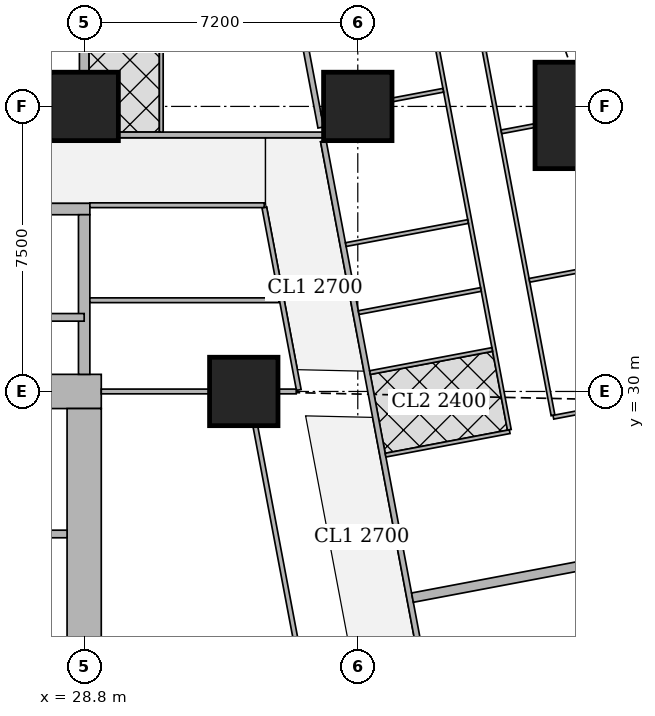
"""IFC4 building model, lengths in metres.
Left out: names, types, materials, properties, quantities, classifications, styles, units other than length and angle.
Written with IfcOpenShell. Run it as: python <this file> out.ifc"""

import sys

from ifc_helpers import new_model, si_unit, direction, frame, frame_2d, origin, origin_2d, place, context, subcontext, project, spatial, rectangle, extrude, element, fill, save


model = new_model("IFC4")
c1 = context("Model", 3, precision=1e-05, world=origin(), true_north=direction((0.0, 1.0)))
c2 = subcontext(c1, "Body", "Model", "MODEL_VIEW")
j1 = project(units=[si_unit("LENGTHUNIT", "METRE"), si_unit("PLANEANGLEUNIT", "RADIAN")], contexts=[c1])
p1 = place(None, origin())
s1 = spatial("IfcSite", under=j1, at=p1, CompositionType="ELEMENT")
p2 = place(p1, origin())
s2 = spatial("IfcBuilding", under=s1, at=p2, CompositionType="ELEMENT")
p3 = place(p2, frame((0.0, 0.0, 53.75)))
s3 = spatial("IfcBuildingStorey", under=s2, at=p3, CompositionType="ELEMENT", Elevation=53.75)
for number, where, z_axis, x_axis in (
    (1, (33.0, 30.0, 0.0), (0.0, 0.0, 1.0), (1.0, 0.0, 0.0)),
    (2, (28.8, 37.5, 0.0), (0.0, 0.0, 1.0), (1.0, 0.0, 0.0)),
    (3, (36.0, 37.5, 0.0), (0.0, 0.0, 1.0), (1.0, 0.0, 0.0)),
):
    element("IfcColumn", number, at=place(p3, frame(where, z_axis=z_axis, x_axis=x_axis)), inside=s3, PredefinedType="COLUMN", context=c2, shape_type="SweptSolid", body=[
        extrude(rectangle(XDim=1.8, YDim=1.8, at=origin_2d()), origin(), (0.0, 0.0, 1.0), 3.75),
    ])
p4 = place(p3, frame((42.064, 37.263, 0.0), z_axis=(0.0, 0.0, 1.0), x_axis=(1.0, 0.0, 0.0)))
e4 = element("IfcColumn", 4, at=p4, inside=s3, PredefinedType="COLUMN", context=c2, shape_type="SweptSolid", body=[
    extrude(rectangle(XDim=2.8, YDim=2.8, at=origin_2d()), origin(), (0.0, 0.0, 1.0), 3.75),
])
p5 = place(p3, frame((13.95, 30.0, 0.0), z_axis=(0.0, 0.0, 1.0), x_axis=(1.0, 0.0, 0.0)))
e5 = element("IfcWall", 5, at=p5, inside=s3, PredefinedType="SHEAR", context=c2, shape_type="SweptSolid", body=[
    extrude(rectangle(XDim=15.3, YDim=0.9, at=frame_2d((7.65, 0.0))), origin(), (0.0, 0.0, 1.0), 3.75),
])
p6 = place(p5, frame((4.45, 0.0, 0.0)))
e6 = element("IfcOpeningElement", 6, at=p6, cuts=e5, PredefinedType="OPENING", context=c2, shape_type="SweptSolid", body=[
    extrude(rectangle(XDim=1.8, YDim=2.1, at=frame_2d((0.9, 1.05))), frame((0.0, 0.46, 0.0), z_axis=(0.0, -1.0, 0.0), x_axis=(1.0, 0.0, 0.0)), (0.0, 0.0, 1.0), 0.92),
])
p7 = place(p5, frame((10.7, 0.0, 0.0)))
e7 = element("IfcOpeningElement", 7, at=p7, cuts=e5, PredefinedType="OPENING", context=c2, shape_type="SweptSolid", body=[
    extrude(rectangle(XDim=1.1, YDim=2.1, at=frame_2d((0.55, 1.05))), frame((0.0, 0.46, 0.0), z_axis=(0.0, -1.0, 0.0), x_axis=(1.0, 0.0, 0.0)), (0.0, 0.0, 1.0), 0.92),
])
p8 = place(p3, frame((28.8, 15.45, 0.0), z_axis=(0.0, 0.0, 1.0), x_axis=(0.0, 1.0, 0.0)))
e8 = element("IfcWall", 8, at=p8, inside=s3, PredefinedType="SHEAR", context=c2, shape_type="SweptSolid", body=[
    extrude(rectangle(XDim=14.1, YDim=0.9, at=frame_2d((7.05, 0.0))), origin(), (0.0, 0.0, 1.0), 3.75),
])
p9 = place(p3, frame((21.45, 34.8, 0.0), z_axis=(0.0, 0.0, 1.0), x_axis=(1.0, 0.0, 0.0)))
e9 = element("IfcWall", 9, at=p9, inside=s3, PredefinedType="SHEAR", context=c2, shape_type="SweptSolid", body=[
    extrude(rectangle(XDim=7.5, YDim=0.3, at=frame_2d((3.75, 0.0))), origin(), (0.0, 0.0, 1.0), 3.75),
])
p10 = place(p9, frame((0.5, 0.0, 0.0)))
e10 = element("IfcOpeningElement", 10, at=p10, cuts=e9, PredefinedType="OPENING", context=c2, shape_type="SweptSolid", body=[
    extrude(rectangle(XDim=1.1, YDim=2.1, at=frame_2d((0.55, 1.05))), frame((0.0, 0.16, 0.0), z_axis=(0.0, -1.0, 0.0), x_axis=(1.0, 0.0, 0.0)), (0.0, 0.0, 1.0), 0.32),
])
p11 = place(p3, frame((28.8, 30.45, 0.0), z_axis=(0.0, 0.0, 1.0), x_axis=(0.0, 1.0, 0.0)))
e11 = element("IfcWall", 11, at=p11, inside=s3, PredefinedType="SHEAR", context=c2, shape_type="SweptSolid", body=[
    extrude(rectangle(XDim=4.2, YDim=0.3, at=frame_2d((2.1, 0.0))), origin(), (0.0, 0.0, 1.0), 3.75),
])
p12 = place(p3, frame((29.701, 36.75, 0.0), z_axis=(0.0, 0.0, 1.0), x_axis=(1.0, 0.0, 0.0)))
e12 = element("IfcWall", 12, at=p12, inside=s3, PredefinedType="SOLIDWALL", context=c2, shape_type="SweptSolid", body=[
    extrude(rectangle(XDim=5.399, YDim=0.15, at=frame_2d((2.7, 0.0))), origin(), (0.0, 0.0, 1.0), 3.5),
])
p13 = place(p12, frame((2.745, 0.0, 0.0)))
e13 = element("IfcOpeningElement", 13, at=p13, cuts=e12, PredefinedType="OPENING", context=c2, shape_type="SweptSolid", body=[
    extrude(rectangle(XDim=1.0, YDim=2.1, at=frame_2d((0.5, 1.05))), frame((0.0, 0.085, 0.0), z_axis=(0.0, -1.0, 0.0), x_axis=(1.0, 0.0, 0.0)), (0.0, 0.0, 1.0), 0.17),
])
p14 = place(p3, frame((33.933, 42.73, 0.0), z_axis=(0.0, 0.0, 1.0), x_axis=(0.185617897238, -0.982622000682, 0.0)))
e14 = element("IfcWall", 14, at=p14, inside=s3, PredefinedType="SOLIDWALL", context=c2, shape_type="SweptSolid", body=[
    extrude(rectangle(XDim=5.887, YDim=0.15, at=frame_2d((2.944, 0.0))), origin(), (0.0, 0.0, 1.0), 3.5),
])
p15 = place(p3, frame((35.094, 36.585, 0.0), z_axis=(0.0, 0.0, 1.0), x_axis=(0.185588860311, -0.982627485331, 0.0)))
e15 = element("IfcWall", 15, at=p15, inside=s3, PredefinedType="SOLIDWALL", context=c2, shape_type="SweptSolid", body=[
    extrude(rectangle(XDim=34.797, YDim=0.15, at=frame_2d((17.399, 0.0))), origin(), (0.0, 0.0, 1.0), 2.5),
])
p16 = place(p15, frame((9.828, 0.0, 0.0)))
e16 = element("IfcOpeningElement", 16, at=p16, cuts=e15, PredefinedType="OPENING", context=c2, shape_type="SweptSolid", body=[
    extrude(rectangle(XDim=1.0, YDim=2.1, at=frame_2d((0.5, 1.05))), frame((0.0, 0.085, 0.0), z_axis=(0.0, -1.0, 0.0), x_axis=(1.0, 0.0, 0.0)), (0.0, 0.0, 1.0), 0.17),
])
p17 = place(p15, frame((13.645, 0.0, 0.0)))
e17 = element("IfcOpeningElement", 17, at=p17, cuts=e15, PredefinedType="OPENING", context=c2, shape_type="SweptSolid", body=[
    extrude(rectangle(XDim=1.0, YDim=2.1, at=frame_2d((0.5, 1.05))), frame((0.0, 0.085, 0.0), z_axis=(0.0, -1.0, 0.0), x_axis=(1.0, 0.0, 0.0)), (0.0, 0.0, 1.0), 0.17),
])
p18 = place(p15, frame((25.9, 0.0, 0.0)))
e18 = element("IfcOpeningElement", 18, at=p18, cuts=e15, PredefinedType="OPENING", context=c2, shape_type="SweptSolid", body=[
    extrude(rectangle(XDim=1.0, YDim=2.1, at=frame_2d((0.5, 1.05))), frame((0.0, 0.085, 0.0), z_axis=(0.0, -1.0, 0.0), x_axis=(1.0, 0.0, 0.0)), (0.0, 0.0, 1.0), 0.17),
])
p19 = place(p3, frame((38.9, 41.22, 0.0), z_axis=(0.0, 0.0, 1.0), x_axis=(0.185521843026, -0.98264014052, 0.0)))
e19 = element("IfcWall", 19, at=p19, inside=s3, PredefinedType="PARTITIONING", context=c2, shape_type="SweptSolid", body=[
    extrude(rectangle(XDim=12.058, YDim=0.1, at=frame_2d((6.029, 0.0))), origin(), (0.0, 0.0, 1.0), 2.5),
])
p20 = place(p19, frame((9.55, 0.0, 0.0)))
e20 = element("IfcOpeningElement", 20, at=p20, cuts=e19, PredefinedType="OPENING", context=c2, shape_type="SweptSolid", body=[
    extrude(rectangle(XDim=0.9, YDim=2.1, at=frame_2d((0.45, 1.05))), frame((0.0, 0.06, 0.0), z_axis=(0.0, -1.0, 0.0), x_axis=(1.0, 0.0, 0.0)), (0.0, 0.0, 1.0), 0.12),
])
p21 = place(p19, frame((7.352, 0.0, 0.0)))
e21 = element("IfcOpeningElement", 21, at=p21, cuts=e19, PredefinedType="OPENING", context=c2, shape_type="SweptSolid", body=[
    extrude(rectangle(XDim=0.9, YDim=2.1, at=frame_2d((0.45, 1.05))), frame((0.0, 0.06, 0.0), z_axis=(0.0, -1.0, 0.0), x_axis=(1.0, 0.0, 0.0)), (0.0, 0.0, 1.0), 0.12),
])
p22 = place(p19, frame((1.9, 0.0, 0.0)))
e22 = element("IfcOpeningElement", 22, at=p22, cuts=e19, PredefinedType="OPENING", context=c2, shape_type="SweptSolid", body=[
    extrude(rectangle(XDim=0.9, YDim=2.1, at=frame_2d((0.45, 1.05))), frame((0.0, 0.06, 0.0), z_axis=(0.0, -1.0, 0.0), x_axis=(1.0, 0.0, 0.0)), (0.0, 0.0, 1.0), 0.12),
])
p23 = place(p3, frame((37.514, 42.089, 0.0), z_axis=(0.0, 0.0, 1.0), x_axis=(0.1856087397, -0.982623730503, 0.0)))
e23 = element("IfcWall", 23, at=p23, inside=s3, PredefinedType="PARTITIONING", context=c2, shape_type="SweptSolid", body=[
    extrude(rectangle(XDim=13.33, YDim=0.1, at=frame_2d((6.665, 0.0))), origin(), (0.0, 0.0, 1.0), 2.5),
])
p24 = place(p23, frame((11.825, 0.0, 0.0)))
e24 = element("IfcOpeningElement", 24, at=p24, cuts=e23, PredefinedType="OPENING", context=c2, shape_type="SweptSolid", body=[
    extrude(rectangle(XDim=0.9, YDim=2.1, at=frame_2d((0.45, 1.05))), frame((0.0, 0.06, 0.0), z_axis=(0.0, -1.0, 0.0), x_axis=(1.0, 0.0, 0.0)), (0.0, 0.0, 1.0), 0.12),
])
p25 = place(p23, frame((8.203, 0.0, 0.0)))
e25 = element("IfcOpeningElement", 25, at=p25, cuts=e23, PredefinedType="OPENING", context=c2, shape_type="SweptSolid", body=[
    extrude(rectangle(XDim=0.9, YDim=2.1, at=frame_2d((0.45, 1.05))), frame((0.0, 0.06, 0.0), z_axis=(0.0, -1.0, 0.0), x_axis=(1.0, 0.0, 0.0)), (0.0, 0.0, 1.0), 0.12),
])
p26 = place(p23, frame((2.63, 0.0, 0.0)))
e26 = element("IfcOpeningElement", 26, at=p26, cuts=e23, PredefinedType="OPENING", context=c2, shape_type="SweptSolid", body=[
    extrude(rectangle(XDim=0.9, YDim=2.1, at=frame_2d((0.45, 1.05))), frame((0.0, 0.06, 0.0), z_axis=(0.0, -1.0, 0.0), x_axis=(1.0, 0.0, 0.0)), (0.0, 0.0, 1.0), 0.12),
])
p27 = place(p23, frame((9.916, 0.0, 0.0)))
e27 = element("IfcOpeningElement", 27, at=p27, cuts=e23, PredefinedType="OPENING", context=c2, shape_type="SweptSolid", body=[
    extrude(rectangle(XDim=0.9, YDim=2.1, at=frame_2d((0.45, 1.05))), frame((0.0, 0.06, 0.0), z_axis=(0.0, -1.0, 0.0), x_axis=(1.0, 0.0, 0.0)), (0.0, 0.0, 1.0), 0.12),
])
p28 = place(p23, frame((5.535, 0.0, 0.0)))
e28 = element("IfcOpeningElement", 28, at=p28, cuts=e23, PredefinedType="OPENING", context=c2, shape_type="SweptSolid", body=[
    extrude(rectangle(XDim=0.9, YDim=2.1, at=frame_2d((0.45, 1.05))), frame((0.0, 0.06, 0.0), z_axis=(0.0, -1.0, 0.0), x_axis=(1.0, 0.0, 0.0)), (0.0, 0.0, 1.0), 0.12),
])
p29 = place(p3, frame((40.654, 36.996, 0.0), z_axis=(0.0, 0.0, 1.0), x_axis=(-0.982672962335, -0.185347913655, 0.0)))
e29 = element("IfcWall", 29, at=p29, inside=s3, PredefinedType="PARTITIONING", context=c2, shape_type="SweptSolid", body=[
    extrude(rectangle(XDim=0.89, YDim=0.1, at=frame_2d((0.445, 0.0))), origin(), (0.0, 0.0, 1.0), 3.5),
])
p30 = place(p3, frame((44.693, 33.713, 0.0), z_axis=(0.0, 0.0, 1.0), x_axis=(-0.982623519589, -0.185609856287, 0.0)))
e30 = element("IfcWall", 30, at=p30, inside=s3, PredefinedType="PARTITIONING", context=c2, shape_type="SweptSolid", body=[
    extrude(rectangle(XDim=4.25, YDim=0.1, at=frame_2d((2.125, 0.0))), origin(), (0.0, 0.0, 1.0), 2.05),
])
p31 = place(p3, frame((42.07, 29.497, 0.0), z_axis=(0.0, 0.0, 1.0), x_axis=(-0.982490624992, -0.186312028067, 0.0)))
e31 = element("IfcWall", 31, at=p31, inside=s3, PredefinedType="PARTITIONING", context=c2, shape_type="SweptSolid", body=[
    extrude(rectangle(XDim=0.939, YDim=0.1, at=frame_2d((0.47, 0.0))), origin(), (0.0, 0.0, 1.0), 2.5),
])
p32 = place(p3, frame((38.25, 37.925, 0.0), z_axis=(0.0, 0.0, 1.0), x_axis=(-0.982650574676, -0.185466568658, 0.0)))
e32 = element("IfcWall", 32, at=p32, inside=s3, PredefinedType="PARTITIONING", context=c2, shape_type="SweptSolid", body=[
    extrude(rectangle(XDim=1.364, YDim=0.1, at=frame_2d((0.682, 0.0))), origin(), (0.0, 0.0, 1.0), 3.5),
])
p33 = place(p3, frame((35.09, 37.328, 0.0), z_axis=(0.0, 0.0, 1.0), x_axis=(-0.982590620415, -0.185783940835, 0.0)))
e33 = element("IfcWall", 33, at=p33, inside=s3, PredefinedType="PARTITIONING", context=c2, shape_type="SweptSolid", body=[
    extrude(rectangle(XDim=0.059, YDim=0.1, at=frame_2d((0.03, 0.0))), origin(), (0.0, 0.0, 1.0), 3.5),
])
p34 = place(p3, frame((39.24, 32.683, 0.0), z_axis=(0.0, 0.0, 1.0), x_axis=(-0.982607026909, -0.185697147715, 0.0)))
e34 = element("IfcWall", 34, at=p34, inside=s3, PredefinedType="PARTITIONING", context=c2, shape_type="SweptSolid", body=[
    extrude(rectangle(XDim=3.275, YDim=0.1, at=frame_2d((1.637, 0.0))), origin(), (0.0, 0.0, 1.0), 3.5),
])
p35 = place(p3, frame((39.997, 28.942, 0.0), z_axis=(0.0, 0.0, 1.0), x_axis=(-0.982569883123, -0.185893584556, 0.0)))
e35 = element("IfcWall", 35, at=p35, inside=s3, PredefinedType="PARTITIONING", context=c2, shape_type="SweptSolid", body=[
    extrude(rectangle(XDim=3.324, YDim=0.1, at=frame_2d((1.662, 0.0))), origin(), (0.0, 0.0, 1.0), 3.5),
])
p36 = place(p3, frame((39.538, 31.104, 0.0), z_axis=(0.0, 0.0, 1.0), x_axis=(-0.982620626894, -0.185625169636, 0.0)))
e36 = element("IfcWall", 36, at=p36, inside=s3, PredefinedType="PARTITIONING", context=c2, shape_type="SweptSolid", body=[
    extrude(rectangle(XDim=3.275, YDim=0.1, at=frame_2d((1.637, 0.0))), origin(), (0.0, 0.0, 1.0), 2.5),
])
p37 = place(p3, frame((38.902, 34.471, 0.0), z_axis=(0.0, 0.0, 1.0), x_axis=(-0.982674977865, -0.185337227447, 0.0)))
e37 = element("IfcWall", 37, at=p37, inside=s3, PredefinedType="PARTITIONING", context=c2, shape_type="SweptSolid", body=[
    extrude(rectangle(XDim=3.275, YDim=0.1, at=frame_2d((1.637, 0.0))), origin(), (0.0, 0.0, 1.0), 3.5),
])
p38 = place(p3, frame((41.885, 25.415, 0.0), z_axis=(0.0, 0.0, 1.0), x_axis=(-0.982612837616, -0.185666398014, 0.0)))
e38 = element("IfcWall", 38, at=p38, inside=s3, PredefinedType="SOLIDWALL", context=c2, shape_type="SweptSolid", body=[
    extrude(rectangle(XDim=4.525, YDim=0.25, at=frame_2d((2.262, 0.0))), origin(), (0.0, 0.0, 1.0), 3.5),
])
p39 = place(p3, frame((30.829, 36.825, 0.0), z_axis=(0.0, 0.0, 1.0), x_axis=(0.0, 1.0, 0.0)))
e39 = element("IfcWall", 39, at=p39, inside=s3, PredefinedType="PARTITIONING", context=c2, shape_type="SweptSolid", body=[
    extrude(rectangle(XDim=3.275, YDim=0.1, at=frame_2d((1.638, 0.0))), origin(), (0.0, 0.0, 1.0), 3.5),
])
p40 = place(p3, frame((28.8, 38.401, 0.0), z_axis=(0.0, 0.0, 1.0), x_axis=(0.0, 1.0, 0.0)))
e40 = element("IfcWall", 40, at=p40, inside=s3, PredefinedType="SOLIDWALL", context=c2, shape_type="SweptSolid", body=[
    extrude(rectangle(XDim=2.949, YDim=0.25, at=frame_2d((1.475, 0.0))), origin(), (0.0, 0.0, 1.0), 3.5),
])
p41 = place(p3, frame((28.95, 34.9, 0.0), z_axis=(0.0, 0.0, 1.0), x_axis=(1.0, 0.0, 0.0)))
e41 = element("IfcWall", 41, at=p41, inside=s3, PredefinedType="PARTITIONING", context=c2, shape_type="SweptSolid", body=[
    extrude(rectangle(XDim=4.588, YDim=0.125, at=frame_2d((2.294, 0.0))), origin(), (0.0, 0.0, 1.0), 3.5),
])
p42 = place(p3, frame((34.448, 30.04, 0.0), z_axis=(0.0, 0.0, 1.0), x_axis=(-0.185749459238, 0.982597139418, 0.0)))
e42 = element("IfcWall", 42, at=p42, inside=s3, PredefinedType="PARTITIONING", context=c2, shape_type="SweptSolid", body=[
    extrude(rectangle(XDim=4.883, YDim=0.125, at=frame_2d((2.441, 0.0))), origin(), (0.0, 0.0, 1.0), 2.5),
])
p43 = place(p42, frame((1.15, 0.0, 0.0)))
e43 = element("IfcOpeningElement", 43, at=p43, cuts=e42, PredefinedType="OPENING", context=c2, shape_type="SweptSolid", body=[
    extrude(rectangle(XDim=1.0, YDim=2.1, at=frame_2d((0.5, 1.05))), frame((0.0, 0.073, 0.0), z_axis=(0.0, -1.0, 0.0), x_axis=(1.0, 0.0, 0.0)), (0.0, 0.0, 1.0), 0.145),
])
p44 = place(p42, frame((3.225, 0.0, 0.0)))
e44 = element("IfcOpeningElement", 44, at=p44, cuts=e42, PredefinedType="OPENING", context=c2, shape_type="SweptSolid", body=[
    extrude(rectangle(XDim=1.0, YDim=2.1, at=frame_2d((0.5, 1.05))), frame((0.0, 0.073, 0.0), z_axis=(0.0, -1.0, 0.0), x_axis=(1.0, 0.0, 0.0)), (0.0, 0.0, 1.0), 0.145),
])
p45 = place(p3, frame((35.793, 15.913, 0.0), z_axis=(0.0, 0.0, 1.0), x_axis=(-0.185651708232, 0.982615613162, 0.0)))
e45 = element("IfcWall", 45, at=p45, inside=s3, PredefinedType="PARTITIONING", context=c2, shape_type="SweptSolid", body=[
    extrude(rectangle(XDim=13.407, YDim=0.125, at=frame_2d((6.704, 0.0))), origin(), (0.0, 0.0, 1.0), 2.5),
])
p46 = place(p45, frame((4.9, 0.0, 0.0)))
e46 = element("IfcOpeningElement", 46, at=p46, cuts=e45, PredefinedType="OPENING", context=c2, shape_type="SweptSolid", body=[
    extrude(rectangle(XDim=1.0, YDim=2.1, at=frame_2d((0.5, 1.05))), frame((0.0, 0.073, 0.0), z_axis=(0.0, -1.0, 0.0), x_axis=(1.0, 0.0, 0.0)), (0.0, 0.0, 1.0), 0.145),
])
p47 = place(p3, frame((29.25, 30.0, 0.0), z_axis=(0.0, 0.0, 1.0), x_axis=(1.0, 0.0, 0.0)))
e47 = element("IfcWall", 47, at=p47, inside=s3, PredefinedType="PARTITIONING", context=c2, shape_type="SweptSolid", body=[
    extrude(rectangle(XDim=2.849, YDim=0.125, at=frame_2d((1.425, 0.0))), origin(), (0.0, 0.0, 1.0), 3.5),
])
p48 = place(p3, frame((33.901, 30.0, 0.0), z_axis=(0.0, 0.0, 1.0), x_axis=(1.0, 0.0, 0.0)))
e48 = element("IfcWall", 48, at=p48, inside=s3, PredefinedType="PARTITIONING", context=c2, shape_type="SweptSolid", body=[
    extrude(rectangle(XDim=0.479, YDim=0.125, at=frame_2d((0.24, 0.0))), origin(), (0.0, 0.0, 1.0), 2.5),
])
p49 = place(p3, frame((28.95, 32.4, 0.0), z_axis=(0.0, 0.0, 1.0), x_axis=(1.0, 0.0, 0.0)))
e49 = element("IfcWall", 49, at=p49, inside=s3, PredefinedType="PARTITIONING", context=c2, shape_type="SweptSolid", body=[
    extrude(rectangle(XDim=4.976, YDim=0.125, at=frame_2d((2.488, 0.0))), origin(), (0.0, 0.0, 1.0), 3.5),
])
p50 = place(p3, frame((23.0, 31.95, 0.0), z_axis=(0.0, 0.0, 1.0), x_axis=(1.0, 0.0, 0.0)))
e50 = element("IfcWall", 50, at=p50, inside=s3, PredefinedType="SHEAR", context=c2, shape_type="SweptSolid", body=[
    extrude(rectangle(XDim=5.8, YDim=0.2, at=frame_2d((2.9, 0.0))), origin(), (0.0, 0.0, 1.0), 3.75),
])
p51 = place(p3, frame((27.4, 26.25, 0.0), z_axis=(0.0, 0.0, 1.0), x_axis=(1.0, 0.0, 0.0)))
e51 = element("IfcWall", 51, at=p51, inside=s3, PredefinedType="SOLIDWALL", context=c2, shape_type="SweptSolid", body=[
    extrude(rectangle(XDim=0.95, YDim=0.2, at=frame_2d((0.475, 0.0))), origin(), (0.0, 0.0, 1.0), 3.5),
])
p52 = place(p20, origin())
e52 = element("IfcDoor", 52, at=p52, inside=s3, OperationType="SINGLE_SWING_LEFT", PredefinedType="DOOR", context=c2, shape_type="SweptSolid", body=[
    extrude(rectangle(XDim=0.9, YDim=2.1, at=frame_2d((0.45, 1.05))), frame((0.0, 0.025, 0.0), z_axis=(0.0, -1.0, 0.0), x_axis=(1.0, 0.0, 0.0)), (0.0, 0.0, 1.0), 0.05),
])
fill(e20, e52)
p53 = place(p21, origin())
e53 = element("IfcDoor", 53, at=p53, inside=s3, OperationType="SINGLE_SWING_RIGHT", PredefinedType="DOOR", context=c2, shape_type="SweptSolid", body=[
    extrude(rectangle(XDim=0.9, YDim=2.1, at=frame_2d((0.45, 1.05))), frame((0.0, 0.025, 0.0), z_axis=(0.0, -1.0, 0.0), x_axis=(1.0, 0.0, 0.0)), (0.0, 0.0, 1.0), 0.05),
])
fill(e21, e53)
p54 = place(p22, origin())
e54 = element("IfcDoor", 54, at=p54, inside=s3, OperationType="SINGLE_SWING_LEFT", PredefinedType="DOOR", context=c2, shape_type="SweptSolid", body=[
    extrude(rectangle(XDim=0.9, YDim=2.1, at=frame_2d((0.45, 1.05))), frame((0.0, 0.025, 0.0), z_axis=(0.0, -1.0, 0.0), x_axis=(1.0, 0.0, 0.0)), (0.0, 0.0, 1.0), 0.05),
])
fill(e22, e54)
p55 = place(p24, origin())
e55 = element("IfcDoor", 55, at=p55, inside=s3, OperationType="SINGLE_SWING_LEFT", PredefinedType="DOOR", context=c2, shape_type="SweptSolid", body=[
    extrude(rectangle(XDim=0.9, YDim=2.1, at=frame_2d((0.45, 1.05))), frame((0.0, 0.025, 0.0), z_axis=(0.0, -1.0, 0.0), x_axis=(1.0, 0.0, 0.0)), (0.0, 0.0, 1.0), 0.05),
])
fill(e24, e55)
p56 = place(p25, origin())
e56 = element("IfcDoor", 56, at=p56, inside=s3, OperationType="SINGLE_SWING_LEFT", PredefinedType="DOOR", context=c2, shape_type="SweptSolid", body=[
    extrude(rectangle(XDim=0.9, YDim=2.1, at=frame_2d((0.45, 1.05))), frame((0.0, 0.025, 0.0), z_axis=(0.0, -1.0, 0.0), x_axis=(1.0, 0.0, 0.0)), (0.0, 0.0, 1.0), 0.05),
])
fill(e25, e56)
p57 = place(p26, origin())
e57 = element("IfcDoor", 57, at=p57, inside=s3, OperationType="SINGLE_SWING_LEFT", PredefinedType="DOOR", context=c2, shape_type="SweptSolid", body=[
    extrude(rectangle(XDim=0.9, YDim=2.1, at=frame_2d((0.45, 1.05))), frame((0.0, 0.025, 0.0), z_axis=(0.0, -1.0, 0.0), x_axis=(1.0, 0.0, 0.0)), (0.0, 0.0, 1.0), 0.05),
])
fill(e26, e57)
p58 = place(p27, origin())
e58 = element("IfcDoor", 58, at=p58, inside=s3, OperationType="SINGLE_SWING_RIGHT", PredefinedType="DOOR", context=c2, shape_type="SweptSolid", body=[
    extrude(rectangle(XDim=0.9, YDim=2.1, at=frame_2d((0.45, 1.05))), frame((0.0, 0.025, 0.0), z_axis=(0.0, -1.0, 0.0), x_axis=(1.0, 0.0, 0.0)), (0.0, 0.0, 1.0), 0.05),
])
fill(e27, e58)
p59 = place(p28, origin())
e59 = element("IfcDoor", 59, at=p59, inside=s3, OperationType="SINGLE_SWING_RIGHT", PredefinedType="DOOR", context=c2, shape_type="SweptSolid", body=[
    extrude(rectangle(XDim=0.9, YDim=2.1, at=frame_2d((0.45, 1.05))), frame((0.0, 0.025, 0.0), z_axis=(0.0, -1.0, 0.0), x_axis=(1.0, 0.0, 0.0)), (0.0, 0.0, 1.0), 0.05),
])
fill(e28, e59)
p60 = place(p16, origin())
e60 = element("IfcDoor", 60, at=p60, inside=s3, OperationType="SINGLE_SWING_LEFT", PredefinedType="DOOR", context=c2, shape_type="SweptSolid", body=[
    extrude(rectangle(XDim=1.0, YDim=2.1, at=frame_2d((0.5, 1.05))), frame((0.0, 0.025, 0.0), z_axis=(0.0, -1.0, 0.0), x_axis=(1.0, 0.0, 0.0)), (0.0, 0.0, 1.0), 0.05),
])
fill(e16, e60)
p61 = place(p13, origin())
e61 = element("IfcDoor", 61, at=p61, inside=s3, OperationType="SINGLE_SWING_RIGHT", PredefinedType="DOOR", context=c2, shape_type="SweptSolid", body=[
    extrude(rectangle(XDim=1.0, YDim=2.1, at=frame_2d((0.5, 1.05))), frame((0.0, 0.025, 0.0), z_axis=(0.0, -1.0, 0.0), x_axis=(1.0, 0.0, 0.0)), (0.0, 0.0, 1.0), 0.05),
])
fill(e13, e61)
p62 = place(p43, origin())
e62 = element("IfcDoor", 62, at=p62, inside=s3, OperationType="SINGLE_SWING_RIGHT", PredefinedType="DOOR", context=c2, shape_type="SweptSolid", body=[
    extrude(rectangle(XDim=1.0, YDim=2.1, at=frame_2d((0.5, 1.05))), frame((0.0, 0.025, 0.0), z_axis=(0.0, -1.0, 0.0), x_axis=(1.0, 0.0, 0.0)), (0.0, 0.0, 1.0), 0.05),
])
fill(e43, e62)
p63 = place(p44, origin())
e63 = element("IfcDoor", 63, at=p63, inside=s3, OperationType="SINGLE_SWING_RIGHT", PredefinedType="DOOR", context=c2, shape_type="SweptSolid", body=[
    extrude(rectangle(XDim=1.0, YDim=2.1, at=frame_2d((0.5, 1.05))), frame((0.0, 0.025, 0.0), z_axis=(0.0, -1.0, 0.0), x_axis=(1.0, 0.0, 0.0)), (0.0, 0.0, 1.0), 0.05),
])
fill(e44, e63)
save(model, sys.argv[1])
